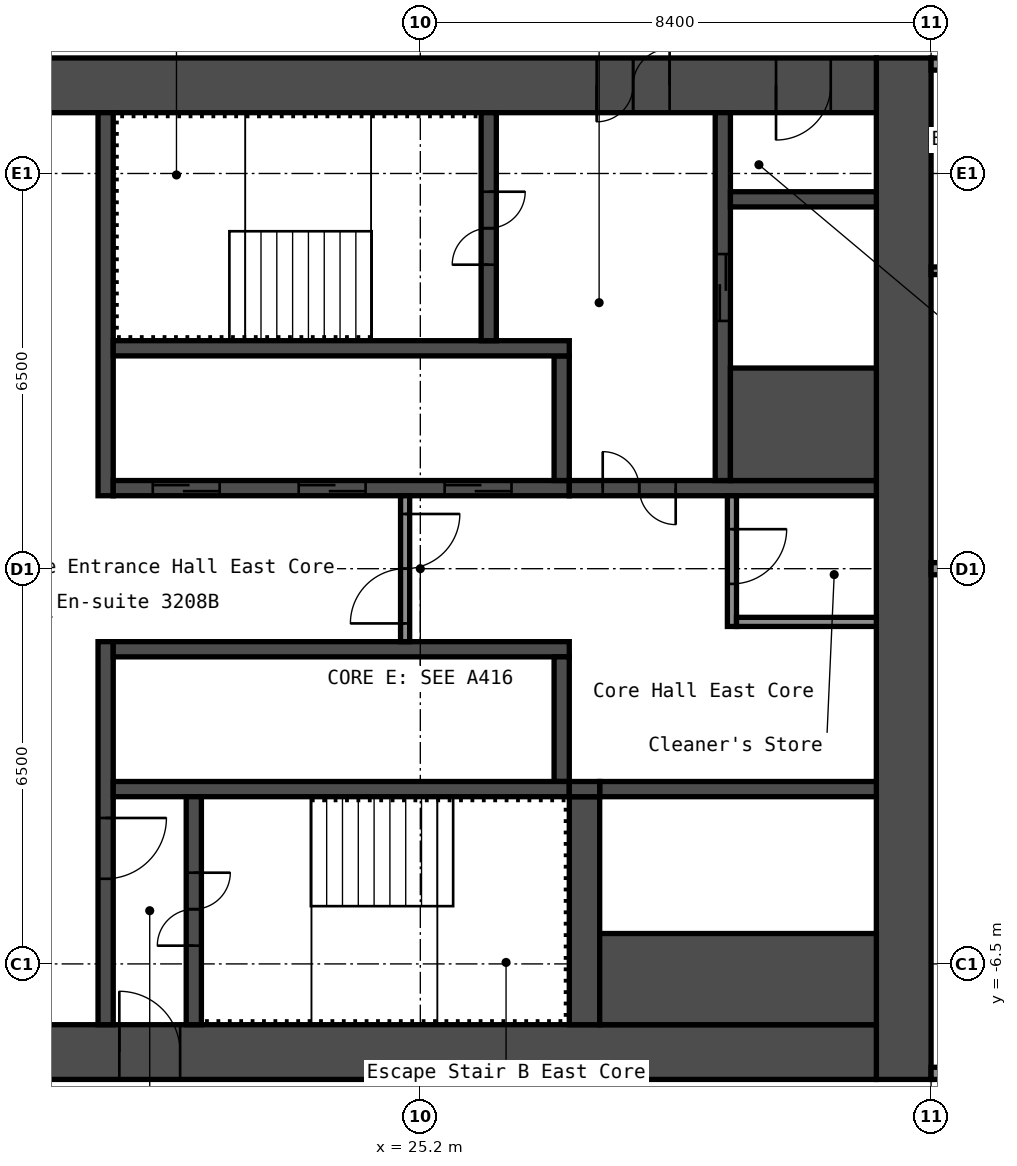
"""IFC4 building model, lengths in metres.
Left out: names, types, materials, properties, quantities, classifications, styles, units other than length and angle.
Written with IfcOpenShell. Run it as: python <this file> out.ifc"""

import sys

from ifc_helpers import new_model, si_unit, direction, frame, frame_2d, origin, place, context, subcontext, project, spatial, rectangle, extrude, element, fill, save


model = new_model("IFC4")
c1 = context("Model", 3, precision=1e-05, world=origin(), true_north=direction((0.0, 1.0)))
c2 = subcontext(c1, "Body", "Model", "MODEL_VIEW")
j1 = project(units=[si_unit("LENGTHUNIT", "METRE"), si_unit("PLANEANGLEUNIT", "RADIAN")], contexts=[c1])
p1 = place(None, origin())
s1 = spatial("IfcSite", under=j1, at=p1, CompositionType="ELEMENT")
p2 = place(p1, origin())
s2 = spatial("IfcBuilding", under=s1, at=p2, CompositionType="ELEMENT")
p3 = place(p2, frame((0.0, 0.0, 113.8)))
s3 = spatial("IfcBuildingStorey", under=s2, at=p3, CompositionType="ELEMENT", Elevation=113.8)
p4 = place(p3, frame((33.15, -8.4, 0.0), z_axis=(0.0, 0.0, 1.0), x_axis=(0.0, 1.0, 0.0)))
e1 = element("IfcWall", 1, at=p4, inside=s3, PredefinedType="SHEAR", context=c2, shape_type="SweptSolid", body=[
    extrude(rectangle(XDim=16.8, YDim=0.9, at=frame_2d((8.4, 0.0))), origin(), (0.0, 0.0, 1.0), 2.8),
])
p5 = place(p3, frame((17.7, 7.95, 0.0), z_axis=(0.0, 0.0, 1.0), x_axis=(1.0, 0.0, 0.0)))
e2 = element("IfcWall", 2, at=p5, inside=s3, PredefinedType="SHEAR", context=c2, shape_type="SweptSolid", body=[
    extrude(rectangle(XDim=15.0, YDim=0.9, at=frame_2d((7.5, 0.0))), origin(), (0.0, 0.0, 1.0), 2.8),
])
p6 = place(p5, frame((10.4, 0.0, 0.0)))
e3 = element("IfcOpeningElement", 3, at=p6, cuts=e2, PredefinedType="OPENING", context=c2, shape_type="SweptSolid", body=[
    extrude(rectangle(XDim=1.2, YDim=2.1, at=frame_2d((0.6, 1.05))), frame((0.0, 0.46, 0.0), z_axis=(0.0, -1.0, 0.0), x_axis=(1.0, 0.0, 0.0)), (0.0, 0.0, 1.0), 0.92),
])
p7 = place(p5, frame((13.35, 0.0, 0.0)))
e4 = element("IfcOpeningElement", 4, at=p7, cuts=e2, PredefinedType="OPENING", context=c2, shape_type="SweptSolid", body=[
    extrude(rectangle(XDim=0.9, YDim=2.1, at=frame_2d((0.45, 1.05))), frame((0.0, 0.46, 0.0), z_axis=(0.0, -1.0, 0.0), x_axis=(1.0, 0.0, 0.0)), (0.0, 0.0, 1.0), 0.92),
])
p8 = place(p3, frame((17.7, -7.95, 0.0), z_axis=(0.0, 0.0, 1.0), x_axis=(1.0, 0.0, 0.0)))
e5 = element("IfcWall", 5, at=p8, inside=s3, PredefinedType="SHEAR", context=c2, shape_type="SweptSolid", body=[
    extrude(rectangle(XDim=15.0, YDim=0.9, at=frame_2d((7.5, 0.0))), origin(), (0.0, 0.0, 1.0), 2.8),
])
p9 = place(p8, frame((2.55, 0.0, 0.0)))
e6 = element("IfcOpeningElement", 6, at=p9, cuts=e5, PredefinedType="OPENING", context=c2, shape_type="SweptSolid", body=[
    extrude(rectangle(XDim=1.0, YDim=2.1, at=frame_2d((0.5, 1.05))), frame((0.0, 0.46, 0.0), z_axis=(0.0, -1.0, 0.0), x_axis=(1.0, 0.0, 0.0)), (0.0, 0.0, 1.0), 0.92),
])
p10 = place(p3, frame((20.025, 1.2, 0.0), z_axis=(0.0, 0.0, 1.0), x_axis=(0.0, 1.0, 0.0)))
e7 = element("IfcWall", 7, at=p10, inside=s3, PredefinedType="SHEAR", context=c2, shape_type="SweptSolid", body=[
    extrude(rectangle(XDim=6.3, YDim=0.25, at=frame_2d((3.15, 0.0))), origin(), (0.0, 0.0, 1.0), 2.8),
])
p11 = place(p3, frame((20.025, -7.5, 0.0), z_axis=(0.0, 0.0, 1.0), x_axis=(0.0, 1.0, 0.0)))
e8 = element("IfcWall", 8, at=p11, inside=s3, PredefinedType="SHEAR", context=c2, shape_type="SweptSolid", body=[
    extrude(rectangle(XDim=6.3, YDim=0.25, at=frame_2d((3.15, 0.0))), origin(), (0.0, 0.0, 1.0), 2.8),
])
p12 = place(p11, frame((2.4, 0.0, 0.0)))
e9 = element("IfcOpeningElement", 9, at=p12, cuts=e8, PredefinedType="OPENING", context=c2, shape_type="SweptSolid", body=[
    extrude(rectangle(XDim=1.0, YDim=2.1, at=frame_2d((0.5, 1.05))), frame((0.0, 0.135, 0.0), z_axis=(0.0, -1.0, 0.0), x_axis=(1.0, 0.0, 0.0)), (0.0, 0.0, 1.0), 0.27),
])
p13 = place(p3, frame((20.15, 1.325, 0.0), z_axis=(0.0, 0.0, 1.0), x_axis=(1.0, 0.0, 0.0)))
e10 = element("IfcWall", 10, at=p13, inside=s3, PredefinedType="SHEAR", context=c2, shape_type="SweptSolid", body=[
    extrude(rectangle(XDim=7.5, YDim=0.25, at=frame_2d((3.75, 0.0))), origin(), (0.0, 0.0, 1.0), 2.8),
])
p14 = place(p13, frame((0.65, 0.0, 0.0)))
e11 = element("IfcOpeningElement", 11, at=p14, cuts=e10, PredefinedType="OPENING", context=c2, shape_type="SweptSolid", body=[
    extrude(rectangle(XDim=1.1, YDim=2.1, at=frame_2d((0.55, 1.05))), frame((0.0, 0.135, 0.0), z_axis=(0.0, -1.0, 0.0), x_axis=(1.0, 0.0, 0.0)), (0.0, 0.0, 1.0), 0.27),
])
p15 = place(p13, frame((3.05, 0.0, 0.0)))
e12 = element("IfcOpeningElement", 12, at=p15, cuts=e10, PredefinedType="OPENING", context=c2, shape_type="SweptSolid", body=[
    extrude(rectangle(XDim=1.1, YDim=2.1, at=frame_2d((0.55, 1.05))), frame((0.0, 0.135, 0.0), z_axis=(0.0, -1.0, 0.0), x_axis=(1.0, 0.0, 0.0)), (0.0, 0.0, 1.0), 0.27),
])
p16 = place(p13, frame((5.45, 0.0, 0.0)))
e13 = element("IfcOpeningElement", 13, at=p16, cuts=e10, PredefinedType="OPENING", context=c2, shape_type="SweptSolid", body=[
    extrude(rectangle(XDim=1.1, YDim=2.1, at=frame_2d((0.55, 1.05))), frame((0.0, 0.135, 0.0), z_axis=(0.0, -1.0, 0.0), x_axis=(1.0, 0.0, 0.0)), (0.0, 0.0, 1.0), 0.27),
])
p17 = place(p3, frame((27.525, 1.45, 0.0), z_axis=(0.0, 0.0, 1.0), x_axis=(0.0, 1.0, 0.0)))
e14 = element("IfcWall", 14, at=p17, inside=s3, PredefinedType="SHEAR", context=c2, shape_type="SweptSolid", body=[
    extrude(rectangle(XDim=2.05, YDim=0.25, at=frame_2d((1.025, 0.0))), origin(), (0.0, 0.0, 1.0), 2.8),
])
p18 = place(p3, frame((20.15, 3.625, 0.0), z_axis=(0.0, 0.0, 1.0), x_axis=(1.0, 0.0, 0.0)))
e15 = element("IfcWall", 15, at=p18, inside=s3, PredefinedType="SHEAR", context=c2, shape_type="SweptSolid", body=[
    extrude(rectangle(XDim=7.5, YDim=0.25, at=frame_2d((3.75, 0.0))), origin(), (0.0, 0.0, 1.0), 2.8),
])
p19 = place(p3, frame((26.325, 3.75, 0.0), z_axis=(0.0, 0.0, 1.0), x_axis=(0.0, 1.0, 0.0)))
e16 = element("IfcWall", 16, at=p19, inside=s3, PredefinedType="SHEAR", context=c2, shape_type="SweptSolid", body=[
    extrude(rectangle(XDim=3.75, YDim=0.25, at=frame_2d((1.875, 0.0))), origin(), (0.0, 0.0, 1.0), 2.8),
])
p20 = place(p19, frame((1.25, 0.0, 0.0)))
e17 = element("IfcOpeningElement", 17, at=p20, cuts=e16, PredefinedType="OPENING", context=c2, shape_type="SweptSolid", body=[
    extrude(rectangle(XDim=1.2, YDim=2.1, at=frame_2d((0.6, 1.05))), frame((0.0, 0.135, 0.0), z_axis=(0.0, -1.0, 0.0), x_axis=(1.0, 0.0, 0.0)), (0.0, 0.0, 1.0), 0.27),
])
p21 = place(p3, frame((27.65, 1.325, 0.0), z_axis=(0.0, 0.0, 1.0), x_axis=(1.0, 0.0, 0.0)))
e18 = element("IfcWall", 18, at=p21, inside=s3, PredefinedType="SHEAR", context=c2, shape_type="SweptSolid", body=[
    extrude(rectangle(XDim=5.05, YDim=0.25, at=frame_2d((2.525, 0.0))), origin(), (0.0, 0.0, 1.0), 2.8),
])
p22 = place(p21, frame((0.55, 0.0, 0.0)))
e19 = element("IfcOpeningElement", 19, at=p22, cuts=e18, PredefinedType="OPENING", context=c2, shape_type="SweptSolid", body=[
    extrude(rectangle(XDim=1.2, YDim=2.1, at=frame_2d((0.6, 1.05))), frame((0.0, 0.135, 0.0), z_axis=(0.0, -1.0, 0.0), x_axis=(1.0, 0.0, 0.0)), (0.0, 0.0, 1.0), 0.27),
])
p23 = place(p3, frame((30.175, 1.45, 0.0), z_axis=(0.0, 0.0, 1.0), x_axis=(0.0, 1.0, 0.0)))
e20 = element("IfcWall", 20, at=p23, inside=s3, PredefinedType="SHEAR", context=c2, shape_type="SweptSolid", body=[
    extrude(rectangle(XDim=6.05, YDim=0.25, at=frame_2d((3.025, 0.0))), origin(), (0.0, 0.0, 1.0), 2.8),
])
p24 = place(p23, frame((2.625, 0.0, 0.0)))
e21 = element("IfcOpeningElement", 21, at=p24, cuts=e20, PredefinedType="OPENING", context=c2, shape_type="SweptSolid", body=[
    extrude(rectangle(XDim=1.1, YDim=2.1, at=frame_2d((0.55, 1.05))), frame((0.0, 0.135, 0.0), z_axis=(0.0, -1.0, 0.0), x_axis=(1.0, 0.0, 0.0)), (0.0, 0.0, 1.0), 0.27),
])
p25 = place(p3, frame((30.3, 2.375, 0.0), z_axis=(0.0, 0.0, 1.0), x_axis=(1.0, 0.0, 0.0)))
e22 = element("IfcWall", 22, at=p25, inside=s3, PredefinedType="SHEAR", context=c2, shape_type="SweptSolid", body=[
    extrude(rectangle(XDim=2.4, YDim=1.85, at=frame_2d((1.2, 0.0))), origin(), (0.0, 0.0, 1.0), 2.8),
])
p26 = place(p3, frame((30.3, 6.075, 0.0), z_axis=(0.0, 0.0, 1.0), x_axis=(1.0, 0.0, 0.0)))
e23 = element("IfcWall", 23, at=p26, inside=s3, PredefinedType="SHEAR", context=c2, shape_type="SweptSolid", body=[
    extrude(rectangle(XDim=2.4, YDim=0.25, at=frame_2d((1.2, 0.0))), origin(), (0.0, 0.0, 1.0), 2.8),
])
p27 = place(p3, frame((20.15, -1.325, 0.0), z_axis=(0.0, 0.0, 1.0), x_axis=(1.0, 0.0, 0.0)))
e24 = element("IfcWall", 24, at=p27, inside=s3, PredefinedType="SHEAR", context=c2, shape_type="SweptSolid", body=[
    extrude(rectangle(XDim=7.5, YDim=0.25, at=frame_2d((3.75, 0.0))), origin(), (0.0, 0.0, 1.0), 2.8),
])
p28 = place(p3, frame((27.525, -3.5, 0.0), z_axis=(0.0, 0.0, 1.0), x_axis=(0.0, 1.0, 0.0)))
e25 = element("IfcWall", 25, at=p28, inside=s3, PredefinedType="SHEAR", context=c2, shape_type="SweptSolid", body=[
    extrude(rectangle(XDim=2.05, YDim=0.25, at=frame_2d((1.025, 0.0))), origin(), (0.0, 0.0, 1.0), 2.8),
])
p29 = place(p3, frame((20.15, -3.625, 0.0), z_axis=(0.0, 0.0, 1.0), x_axis=(1.0, 0.0, 0.0)))
e26 = element("IfcWall", 26, at=p29, inside=s3, PredefinedType="SHEAR", context=c2, shape_type="SweptSolid", body=[
    extrude(rectangle(XDim=7.5, YDim=0.25, at=frame_2d((3.75, 0.0))), origin(), (0.0, 0.0, 1.0), 2.8),
])
p30 = place(p3, frame((21.475, -7.5, 0.0), z_axis=(0.0, 0.0, 1.0), x_axis=(0.0, 1.0, 0.0)))
e27 = element("IfcWall", 27, at=p30, inside=s3, PredefinedType="SHEAR", context=c2, shape_type="SweptSolid", body=[
    extrude(rectangle(XDim=3.75, YDim=0.25, at=frame_2d((1.875, 0.0))), origin(), (0.0, 0.0, 1.0), 2.8),
])
p31 = place(p30, frame((1.3, 0.0, 0.0)))
e28 = element("IfcOpeningElement", 28, at=p31, cuts=e27, PredefinedType="OPENING", context=c2, shape_type="SweptSolid", body=[
    extrude(rectangle(XDim=1.2, YDim=2.1, at=frame_2d((0.6, 1.05))), frame((0.0, 0.135, 0.0), z_axis=(0.0, -1.0, 0.0), x_axis=(1.0, 0.0, 0.0)), (0.0, 0.0, 1.0), 0.27),
])
p32 = place(p3, frame((27.9, -7.5, 0.0), z_axis=(0.0, 0.0, 1.0), x_axis=(0.0, 1.0, 0.0)))
e29 = element("IfcWall", 29, at=p32, inside=s3, PredefinedType="SHEAR", context=c2, shape_type="SweptSolid", body=[
    extrude(rectangle(XDim=3.75, YDim=0.5, at=frame_2d((1.875, 0.0))), origin(), (0.0, 0.0, 1.0), 2.8),
])
p33 = place(p3, frame((28.15, -3.625, 0.0), z_axis=(0.0, 0.0, 1.0), x_axis=(1.0, 0.0, 0.0)))
e30 = element("IfcWall", 30, at=p33, inside=s3, PredefinedType="SHEAR", context=c2, shape_type="SweptSolid", body=[
    extrude(rectangle(XDim=4.55, YDim=0.25, at=frame_2d((2.275, 0.0))), origin(), (0.0, 0.0, 1.0), 2.8),
])
p34 = place(p3, frame((28.15, -6.75, 0.0), z_axis=(0.0, 0.0, 1.0), x_axis=(1.0, 0.0, 0.0)))
e31 = element("IfcWall", 31, at=p34, inside=s3, PredefinedType="SHEAR", context=c2, shape_type="SweptSolid", body=[
    extrude(rectangle(XDim=4.55, YDim=1.5, at=frame_2d((2.275, 0.0))), origin(), (0.0, 0.0, 1.0), 2.8),
])
p35 = place(p3, frame((27.65, -3.625, 0.0), z_axis=(0.0, 0.0, 1.0), x_axis=(1.0, 0.0, 0.0)))
e32 = element("IfcWall", 32, at=p35, inside=s3, PredefinedType="SHEAR", context=c2, shape_type="SweptSolid", body=[
    extrude(rectangle(XDim=0.5, YDim=0.25, at=frame_2d((0.25, 0.0))), origin(), (0.0, 0.0, 1.0), 2.8),
])
p36 = place(p3, frame((24.95, -1.2, 0.0), z_axis=(0.0, 0.0, 1.0), x_axis=(0.0, 1.0, 0.0)))
e33 = element("IfcWall", 33, at=p36, inside=s3, PredefinedType="PARTITIONING", context=c2, shape_type="SweptSolid", body=[
    extrude(rectangle(XDim=2.4, YDim=0.15, at=frame_2d((1.2, 0.0))), origin(), (0.0, 0.0, 1.0), 2.8),
])
p37 = place(p36, frame((0.3, 0.0, 0.0)))
e34 = element("IfcOpeningElement", 34, at=p37, cuts=e33, PredefinedType="OPENING", context=c2, shape_type="SweptSolid", body=[
    extrude(rectangle(XDim=1.8, YDim=2.1, at=frame_2d((0.9, 1.05))), frame((0.0, 0.085, 0.0), z_axis=(0.0, -1.0, 0.0), x_axis=(1.0, 0.0, 0.0)), (0.0, 0.0, 1.0), 0.17),
])
p38 = place(p3, frame((30.325, -0.95, 0.0), z_axis=(0.0, 0.0, 1.0), x_axis=(0.0, 1.0, 0.0)))
e35 = element("IfcWall", 35, at=p38, inside=s3, PredefinedType="PARTITIONING", context=c2, shape_type="SweptSolid", body=[
    extrude(rectangle(XDim=2.15, YDim=0.15, at=frame_2d((1.075, 0.0))), origin(), (0.0, 0.0, 1.0), 2.8),
])
p39 = place(p38, frame((0.7, 0.0, 0.0)))
e36 = element("IfcOpeningElement", 36, at=p39, cuts=e35, PredefinedType="OPENING", context=c2, shape_type="SweptSolid", body=[
    extrude(rectangle(XDim=0.9, YDim=2.1, at=frame_2d((0.45, 1.05))), frame((0.0, 0.085, 0.0), z_axis=(0.0, -1.0, 0.0), x_axis=(1.0, 0.0, 0.0)), (0.0, 0.0, 1.0), 0.17),
])
p40 = place(p3, frame((30.4, -0.875, 0.0), z_axis=(0.0, 0.0, 1.0), x_axis=(1.0, 0.0, 0.0)))
e37 = element("IfcWall", 37, at=p40, inside=s3, PredefinedType="PARTITIONING", context=c2, shape_type="SweptSolid", body=[
    extrude(rectangle(XDim=2.3, YDim=0.15, at=frame_2d((1.15, 0.0))), origin(), (0.0, 0.0, 1.0), 2.8),
])
p41 = place(p3, frame((33.6, -8.3, 0.0), z_axis=(0.0, 0.0, 1.0), x_axis=(1.0, 0.0, 0.0)))
e38 = element("IfcWall", 38, at=p41, inside=s3, PredefinedType="PARTITIONING", context=c2, shape_type="SweptSolid", body=[
    extrude(rectangle(XDim=10.4, YDim=0.2, at=frame_2d((5.2, 0.0))), origin(), (0.0, 0.0, 1.0), 2.8),
])
p42 = place(p41, frame((3.05, 0.0, 0.0)))
e39 = element("IfcOpeningElement", 39, at=p42, cuts=e38, PredefinedType="OPENING", context=c2, shape_type="SweptSolid", body=[
    extrude(rectangle(XDim=1.0, YDim=2.1, at=frame_2d((0.5, 1.05))), frame((0.0, 0.11, 0.0), z_axis=(0.0, -1.0, 0.0), x_axis=(1.0, 0.0, 0.0)), (0.0, 0.0, 1.0), 0.22),
])
p43 = place(p3, frame((33.6, 0.0, 0.0), z_axis=(0.0, 0.0, 1.0), x_axis=(1.0, 0.0, 0.0)))
e40 = element("IfcWall", 40, at=p43, inside=s3, PredefinedType="PARTITIONING", context=c2, shape_type="SweptSolid", body=[
    extrude(rectangle(XDim=10.3, YDim=0.2, at=frame_2d((5.15, 0.0))), origin(), (0.0, 0.0, 1.0), 2.8),
])
p44 = place(p3, frame((33.6, 4.9, 0.0), z_axis=(0.0, 0.0, 1.0), x_axis=(1.0, 0.0, 0.0)))
e41 = element("IfcWall", 41, at=p44, inside=s3, PredefinedType="PARTITIONING", context=c2, shape_type="SweptSolid", body=[
    extrude(rectangle(XDim=3.337, YDim=0.125, at=frame_2d((1.669, 0.0))), origin(), (0.0, 0.0, 1.0), 2.8),
])
p45 = place(p44, frame((1.3, 0.0, 0.0)))
e42 = element("IfcOpeningElement", 42, at=p45, cuts=e41, PredefinedType="OPENING", context=c2, shape_type="SweptSolid", body=[
    extrude(rectangle(XDim=0.8, YDim=2.1, at=frame_2d((0.4, 1.05))), frame((0.0, 0.073, 0.0), z_axis=(0.0, -1.0, 0.0), x_axis=(1.0, 0.0, 0.0)), (0.0, 0.0, 1.0), 0.145),
])
p46 = place(p3, frame((33.6, 8.3, 0.0), z_axis=(0.0, 0.0, 1.0), x_axis=(1.0, 0.0, 0.0)))
e43 = element("IfcWall", 43, at=p46, inside=s3, PredefinedType="PARTITIONING", context=c2, shape_type="SweptSolid", body=[
    extrude(rectangle(XDim=10.4, YDim=0.2, at=frame_2d((5.2, 0.0))), origin(), (0.0, 0.0, 1.0), 2.8),
])
p47 = place(p46, frame((6.35, 0.0, 0.0)))
e44 = element("IfcOpeningElement", 44, at=p47, cuts=e43, PredefinedType="OPENING", context=c2, shape_type="SweptSolid", body=[
    extrude(rectangle(XDim=1.0, YDim=2.1, at=frame_2d((0.5, 1.05))), frame((0.0, 0.11, 0.0), z_axis=(0.0, -1.0, 0.0), x_axis=(1.0, 0.0, 0.0)), (0.0, 0.0, 1.0), 0.22),
])
p48 = place(p6, origin())
e45 = element("IfcDoor", 45, at=p48, inside=s3, OperationType="DOUBLE_DOOR_SINGLE_SWING", PredefinedType="DOOR", context=c2, shape_type="SweptSolid", body=[
    extrude(rectangle(XDim=1.2, YDim=2.1, at=frame_2d((0.6, 1.05))), frame((0.0, 0.025, 0.0), z_axis=(0.0, -1.0, 0.0), x_axis=(1.0, 0.0, 0.0)), (0.0, 0.0, 1.0), 0.05),
])
fill(e3, e45)
p49 = place(p7, origin())
e46 = element("IfcDoor", 46, at=p49, inside=s3, OperationType="SINGLE_SWING_LEFT", PredefinedType="DOOR", context=c2, shape_type="SweptSolid", body=[
    extrude(rectangle(XDim=0.9, YDim=2.1, at=frame_2d((0.45, 1.05))), frame((0.0, 0.025, 0.0), z_axis=(0.0, -1.0, 0.0), x_axis=(1.0, 0.0, 0.0)), (0.0, 0.0, 1.0), 0.05),
])
fill(e4, e46)
p50 = place(p9, origin())
e47 = element("IfcDoor", 47, at=p50, inside=s3, OperationType="SINGLE_SWING_RIGHT", PredefinedType="DOOR", context=c2, shape_type="SweptSolid", body=[
    extrude(rectangle(XDim=1.0, YDim=2.1, at=frame_2d((0.5, 1.05))), frame((0.0, 0.025, 0.0), z_axis=(0.0, -1.0, 0.0), x_axis=(1.0, 0.0, 0.0)), (0.0, 0.0, 1.0), 0.05),
])
fill(e6, e47)
p51 = place(p20, origin())
e48 = element("IfcDoor", 48, at=p51, inside=s3, OperationType="DOUBLE_DOOR_SINGLE_SWING", PredefinedType="DOOR", context=c2, shape_type="SweptSolid", body=[
    extrude(rectangle(XDim=1.2, YDim=2.1, at=frame_2d((0.6, 1.05))), frame((0.0, 0.025, 0.0), z_axis=(0.0, -1.0, 0.0), x_axis=(1.0, 0.0, 0.0)), (0.0, 0.0, 1.0), 0.05),
])
fill(e17, e48)
p52 = place(p31, origin())
e49 = element("IfcDoor", 49, at=p52, inside=s3, OperationType="DOUBLE_DOOR_SINGLE_SWING", PredefinedType="DOOR", context=c2, shape_type="SweptSolid", body=[
    extrude(rectangle(XDim=1.2, YDim=2.1, at=frame_2d((0.6, 1.05))), frame((0.0, 0.025, 0.0), z_axis=(0.0, -1.0, 0.0), x_axis=(1.0, 0.0, 0.0)), (0.0, 0.0, 1.0), 0.05),
])
fill(e28, e49)
p53 = place(p12, origin())
e50 = element("IfcDoor", 50, at=p53, inside=s3, OperationType="SINGLE_SWING_RIGHT", PredefinedType="DOOR", context=c2, shape_type="SweptSolid", body=[
    extrude(rectangle(XDim=1.0, YDim=2.1, at=frame_2d((0.5, 1.05))), frame((0.0, 0.025, 0.0), z_axis=(0.0, -1.0, 0.0), x_axis=(1.0, 0.0, 0.0)), (0.0, 0.0, 1.0), 0.05),
])
fill(e9, e50)
p54 = place(p22, origin())
e51 = element("IfcDoor", 51, at=p54, inside=s3, OperationType="DOUBLE_DOOR_SINGLE_SWING", PredefinedType="DOOR", context=c2, shape_type="SweptSolid", body=[
    extrude(rectangle(XDim=1.2, YDim=2.1, at=frame_2d((0.6, 1.05))), frame((0.0, 0.025, 0.0), z_axis=(0.0, -1.0, 0.0), x_axis=(1.0, 0.0, 0.0)), (0.0, 0.0, 1.0), 0.05),
])
fill(e19, e51)
p55 = place(p37, origin())
e52 = element("IfcDoor", 52, at=p55, inside=s3, OperationType="DOUBLE_DOOR_SINGLE_SWING", PredefinedType="DOOR", context=c2, shape_type="SweptSolid", body=[
    extrude(rectangle(XDim=1.8, YDim=2.1, at=frame_2d((0.9, 1.05))), frame((0.0, 0.025, 0.0), z_axis=(0.0, -1.0, 0.0), x_axis=(1.0, 0.0, 0.0)), (0.0, 0.0, 1.0), 0.05),
])
fill(e34, e52)
p56 = place(p39, origin())
e53 = element("IfcDoor", 53, at=p56, inside=s3, OperationType="SINGLE_SWING_RIGHT", PredefinedType="DOOR", context=c2, shape_type="SweptSolid", body=[
    extrude(rectangle(XDim=0.9, YDim=2.1, at=frame_2d((0.45, 1.05))), frame((0.0, 0.025, 0.0), z_axis=(0.0, -1.0, 0.0), x_axis=(1.0, 0.0, 0.0)), (0.0, 0.0, 1.0), 0.05),
])
fill(e36, e53)
p57 = place(p14, origin())
e54 = element("IfcDoor", 54, at=p57, inside=s3, OperationType="DOUBLE_DOOR_SLIDING", PredefinedType="DOOR", context=c2, shape_type="SweptSolid", body=[
    extrude(rectangle(XDim=1.1, YDim=2.1, at=frame_2d((0.55, 1.05))), frame((0.0, 0.025, 0.0), z_axis=(0.0, -1.0, 0.0), x_axis=(1.0, 0.0, 0.0)), (0.0, 0.0, 1.0), 0.05),
])
fill(e11, e54)
p58 = place(p15, origin())
e55 = element("IfcDoor", 55, at=p58, inside=s3, OperationType="DOUBLE_DOOR_SLIDING", PredefinedType="DOOR", context=c2, shape_type="SweptSolid", body=[
    extrude(rectangle(XDim=1.1, YDim=2.1, at=frame_2d((0.55, 1.05))), frame((0.0, 0.025, 0.0), z_axis=(0.0, -1.0, 0.0), x_axis=(1.0, 0.0, 0.0)), (0.0, 0.0, 1.0), 0.05),
])
fill(e12, e55)
p59 = place(p16, origin())
e56 = element("IfcDoor", 56, at=p59, inside=s3, OperationType="DOUBLE_DOOR_SLIDING", PredefinedType="DOOR", context=c2, shape_type="SweptSolid", body=[
    extrude(rectangle(XDim=1.1, YDim=2.1, at=frame_2d((0.55, 1.05))), frame((0.0, 0.025, 0.0), z_axis=(0.0, -1.0, 0.0), x_axis=(1.0, 0.0, 0.0)), (0.0, 0.0, 1.0), 0.05),
])
fill(e13, e56)
p60 = place(p24, origin())
e57 = element("IfcDoor", 57, at=p60, inside=s3, OperationType="DOUBLE_DOOR_SLIDING", PredefinedType="DOOR", context=c2, shape_type="SweptSolid", body=[
    extrude(rectangle(XDim=1.1, YDim=2.1, at=frame_2d((0.55, 1.05))), frame((0.0, 0.025, 0.0), z_axis=(0.0, -1.0, 0.0), x_axis=(1.0, 0.0, 0.0)), (0.0, 0.0, 1.0), 0.05),
])
fill(e21, e57)
save(model, sys.argv[1])
